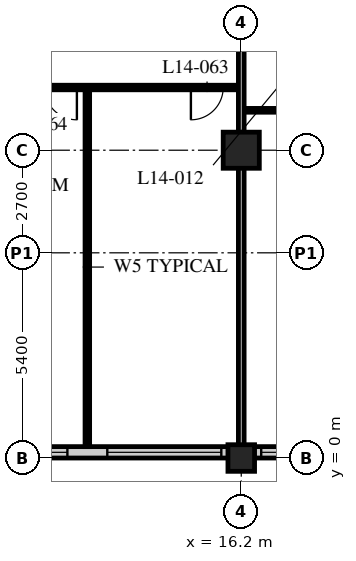
"""IFC4 building model, lengths in metres.
Left out: names, types, materials, properties, quantities, classifications, styles, units other than length and angle.
Written with IfcOpenShell. Run it as: python <this file> out.ifc"""

import sys

from ifc_helpers import new_model, si_unit, direction, frame, frame_2d, origin, origin_2d, place, context, subcontext, project, spatial, rectangle, hollow_rectangle, extrude, element, fill, save


model = new_model("IFC4")
c1 = context("Model", 3, precision=1e-05, world=origin(), true_north=direction((0.0, 1.0)))
c2 = subcontext(c1, "Body", "Model", "MODEL_VIEW")
j1 = project(units=[si_unit("LENGTHUNIT", "METRE"), si_unit("PLANEANGLEUNIT", "RADIAN")], contexts=[c1])
p1 = place(None, origin())
s1 = spatial("IfcSite", under=j1, at=p1, CompositionType="ELEMENT")
p2 = place(p1, origin())
s2 = spatial("IfcBuilding", under=s1, at=p2, CompositionType="ELEMENT")
p3 = place(p2, frame((0.0, 0.0, 60.2)))
s3 = spatial("IfcBuildingStorey", under=s2, at=p3, CompositionType="ELEMENT", Elevation=60.2)
p4 = place(p3, frame((16.2, 0.0, 0.0), z_axis=(0.0, 0.0, 1.0), x_axis=(1.0, 0.0, 0.0)))
e1 = element("IfcColumn", 1, at=p4, inside=s3, PredefinedType="COLUMN", context=c2, shape_type="SweptSolid", body=[
    extrude(hollow_rectangle(XDim=0.7, YDim=0.7, WallThickness=0.06, at=origin_2d()), origin(), (0.0, 0.0, 1.0), 3.4),
])
p5 = place(p3, frame((16.2, 8.1, 0.0), z_axis=(0.0, 0.0, 1.0), x_axis=(1.0, 0.0, 0.0)))
e2 = element("IfcColumn", 2, at=p5, inside=s3, PredefinedType="COLUMN", context=c2, shape_type="SweptSolid", body=[
    extrude(hollow_rectangle(XDim=0.95, YDim=0.95, WallThickness=0.095, at=origin_2d()), origin(), (0.0, 0.0, 1.0), 3.4),
])
p6 = place(p3, frame((8.4, 0.15, 0.0), z_axis=(0.0, 0.0, 1.0), x_axis=(1.0, 0.0, 0.0)))
e3 = element("IfcWall", 3, at=p6, inside=s3, PredefinedType="SOLIDWALL", context=c2, shape_type="SweptSolid", body=[
    extrude(rectangle(XDim=40.2, YDim=0.3, at=frame_2d((20.1, 0.0))), origin(), (0.0, 0.0, 1.0), 3.19),
])
p7 = place(p6, frame((0.225, 0.0, 0.9)))
e4 = element("IfcOpeningElement", 4, at=p7, cuts=e3, PredefinedType="OPENING", context=c2, shape_type="SweptSolid", body=[
    extrude(rectangle(XDim=3.0, YDim=2.0, at=frame_2d((1.5, 1.0))), frame((0.0, 0.16, 0.0), z_axis=(0.0, -1.0, 0.0), x_axis=(1.0, 0.0, 0.0)), (0.0, 0.0, 1.0), 0.32),
])
p8 = place(p6, frame((4.275, 0.0, 0.9)))
e5 = element("IfcOpeningElement", 5, at=p8, cuts=e3, PredefinedType="OPENING", context=c2, shape_type="SweptSolid", body=[
    extrude(rectangle(XDim=3.0, YDim=2.0, at=frame_2d((1.5, 1.0))), frame((0.0, 0.16, 0.0), z_axis=(0.0, -1.0, 0.0), x_axis=(1.0, 0.0, 0.0)), (0.0, 0.0, 1.0), 0.32),
])
p9 = place(p6, frame((8.325, 0.0, 0.9)))
e6 = element("IfcOpeningElement", 6, at=p9, cuts=e3, PredefinedType="OPENING", context=c2, shape_type="SweptSolid", body=[
    extrude(rectangle(XDim=3.0, YDim=2.0, at=frame_2d((1.5, 1.0))), frame((0.0, 0.16, 0.0), z_axis=(0.0, -1.0, 0.0), x_axis=(1.0, 0.0, 0.0)), (0.0, 0.0, 1.0), 0.32),
])
p10 = place(p6, frame((12.375, 0.0, 0.9)))
e7 = element("IfcOpeningElement", 7, at=p10, cuts=e3, PredefinedType="OPENING", context=c2, shape_type="SweptSolid", body=[
    extrude(rectangle(XDim=3.0, YDim=2.0, at=frame_2d((1.5, 1.0))), frame((0.0, 0.16, 0.0), z_axis=(0.0, -1.0, 0.0), x_axis=(1.0, 0.0, 0.0)), (0.0, 0.0, 1.0), 0.32),
])
p11 = place(p6, frame((16.425, 0.0, 0.9)))
e8 = element("IfcOpeningElement", 8, at=p11, cuts=e3, PredefinedType="OPENING", context=c2, shape_type="SweptSolid", body=[
    extrude(rectangle(XDim=3.0, YDim=2.0, at=frame_2d((1.5, 1.0))), frame((0.0, 0.16, 0.0), z_axis=(0.0, -1.0, 0.0), x_axis=(1.0, 0.0, 0.0)), (0.0, 0.0, 1.0), 0.32),
])
p12 = place(p6, frame((20.475, 0.0, 0.9)))
e9 = element("IfcOpeningElement", 9, at=p12, cuts=e3, PredefinedType="OPENING", context=c2, shape_type="SweptSolid", body=[
    extrude(rectangle(XDim=3.0, YDim=2.0, at=frame_2d((1.5, 1.0))), frame((0.0, 0.16, 0.0), z_axis=(0.0, -1.0, 0.0), x_axis=(1.0, 0.0, 0.0)), (0.0, 0.0, 1.0), 0.32),
])
p13 = place(p6, frame((24.525, 0.0, 0.9)))
e10 = element("IfcOpeningElement", 10, at=p13, cuts=e3, PredefinedType="OPENING", context=c2, shape_type="SweptSolid", body=[
    extrude(rectangle(XDim=3.0, YDim=2.0, at=frame_2d((1.5, 1.0))), frame((0.0, 0.16, 0.0), z_axis=(0.0, -1.0, 0.0), x_axis=(1.0, 0.0, 0.0)), (0.0, 0.0, 1.0), 0.32),
])
p14 = place(p6, frame((28.575, 0.0, 0.9)))
e11 = element("IfcOpeningElement", 11, at=p14, cuts=e3, PredefinedType="OPENING", context=c2, shape_type="SweptSolid", body=[
    extrude(rectangle(XDim=3.0, YDim=2.0, at=frame_2d((1.5, 1.0))), frame((0.0, 0.16, 0.0), z_axis=(0.0, -1.0, 0.0), x_axis=(1.0, 0.0, 0.0)), (0.0, 0.0, 1.0), 0.32),
])
p15 = place(p6, frame((32.625, 0.0, 0.9)))
e12 = element("IfcOpeningElement", 12, at=p15, cuts=e3, PredefinedType="OPENING", context=c2, shape_type="SweptSolid", body=[
    extrude(rectangle(XDim=3.0, YDim=2.0, at=frame_2d((1.5, 1.0))), frame((0.0, 0.16, 0.0), z_axis=(0.0, -1.0, 0.0), x_axis=(1.0, 0.0, 0.0)), (0.0, 0.0, 1.0), 0.32),
])
p16 = place(p6, frame((36.675, 0.0, 0.9)))
e13 = element("IfcOpeningElement", 13, at=p16, cuts=e3, PredefinedType="OPENING", context=c2, shape_type="SweptSolid", body=[
    extrude(rectangle(XDim=3.0, YDim=2.0, at=frame_2d((1.5, 1.0))), frame((0.0, 0.16, 0.0), z_axis=(0.0, -1.0, 0.0), x_axis=(1.0, 0.0, 0.0)), (0.0, 0.0, 1.0), 0.32),
])
p17 = place(p3, frame((16.2, 9.15, 0.0), z_axis=(0.0, 0.0, 1.0), x_axis=(1.0, 0.0, 0.0)))
e14 = element("IfcWall", 14, at=p17, inside=s3, PredefinedType="PARTITIONING", context=c2, shape_type="SweptSolid", body=[
    extrude(rectangle(XDim=2.3, YDim=0.1, at=frame_2d((1.15, 0.0))), origin(), (0.0, 0.0, 1.0), 3.19),
])
p18 = place(p3, frame((8.15, 9.75, 0.0), z_axis=(0.0, 0.0, 1.0), x_axis=(1.0, 0.0, 0.0)))
e15 = element("IfcWall", 15, at=p18, inside=s3, PredefinedType="PARTITIONING", context=c2, shape_type="SweptSolid", body=[
    extrude(rectangle(XDim=8.05, YDim=0.12, at=frame_2d((4.025, 0.0))), origin(), (0.0, 0.0, 1.0), 3.19),
])
p19 = place(p18, frame((6.725, 0.0, 0.0)))
e16 = element("IfcOpeningElement", 16, at=p19, cuts=e15, PredefinedType="OPENING", context=c2, shape_type="SweptSolid", body=[
    extrude(rectangle(XDim=0.85, YDim=2.1, at=frame_2d((0.425, 1.05))), frame((0.0, 0.07, 0.0), z_axis=(0.0, -1.0, 0.0), x_axis=(1.0, 0.0, 0.0)), (0.0, 0.0, 1.0), 0.14),
])
p20 = place(p18, frame((2.875, 0.0, 0.0)))
e17 = element("IfcOpeningElement", 17, at=p20, cuts=e15, PredefinedType="OPENING", context=c2, shape_type="SweptSolid", body=[
    extrude(rectangle(XDim=0.85, YDim=2.1, at=frame_2d((0.425, 1.05))), frame((0.0, 0.07, 0.0), z_axis=(0.0, -1.0, 0.0), x_axis=(1.0, 0.0, 0.0)), (0.0, 0.0, 1.0), 0.14),
])
p21 = place(p3, frame((12.15, 9.75, 0.0), z_axis=(0.0, 0.0, 1.0), x_axis=(0.0, -1.0, 0.0)))
e18 = element("IfcWall", 18, at=p21, inside=s3, PredefinedType="PARTITIONING", context=c2, shape_type="SweptSolid", body=[
    extrude(rectangle(XDim=9.45, YDim=0.12, at=frame_2d((4.725, 0.0))), origin(), (0.0, 0.0, 1.0), 3.19),
])
p22 = place(p3, frame((16.2, 12.15, 0.0), z_axis=(0.0, 0.0, 1.0), x_axis=(0.0, -1.0, 0.0)))
e19 = element("IfcWall", 19, at=p22, inside=s3, PredefinedType="PARTITIONING", context=c2, shape_type="SweptSolid", body=[
    extrude(rectangle(XDim=11.85, YDim=0.15, at=frame_2d((5.925, 0.0))), origin(), (0.0, 0.0, 1.0), 2.578),
])
p23 = place(p7, origin())
e20 = element("IfcWindow", 20, at=p23, inside=s3, PartitioningType="SINGLE_PANEL", PredefinedType="WINDOW", context=c2, shape_type="SweptSolid", body=[
    extrude(rectangle(XDim=3.0, YDim=2.0, at=frame_2d((1.5, 1.0))), frame((0.0, 0.03, 0.0), z_axis=(0.0, -1.0, 0.0), x_axis=(1.0, 0.0, 0.0)), (0.0, 0.0, 1.0), 0.06),
])
fill(e4, e20)
p24 = place(p8, origin())
e21 = element("IfcWindow", 21, at=p24, inside=s3, PartitioningType="SINGLE_PANEL", PredefinedType="WINDOW", context=c2, shape_type="SweptSolid", body=[
    extrude(rectangle(XDim=3.0, YDim=2.0, at=frame_2d((1.5, 1.0))), frame((0.0, 0.03, 0.0), z_axis=(0.0, -1.0, 0.0), x_axis=(1.0, 0.0, 0.0)), (0.0, 0.0, 1.0), 0.06),
])
fill(e5, e21)
p25 = place(p9, origin())
e22 = element("IfcWindow", 22, at=p25, inside=s3, PartitioningType="SINGLE_PANEL", PredefinedType="WINDOW", context=c2, shape_type="SweptSolid", body=[
    extrude(rectangle(XDim=3.0, YDim=2.0, at=frame_2d((1.5, 1.0))), frame((0.0, 0.03, 0.0), z_axis=(0.0, -1.0, 0.0), x_axis=(1.0, 0.0, 0.0)), (0.0, 0.0, 1.0), 0.06),
])
fill(e6, e22)
p26 = place(p19, origin())
e23 = element("IfcDoor", 23, at=p26, inside=s3, OperationType="SINGLE_SWING_RIGHT", PredefinedType="DOOR", context=c2, shape_type="SweptSolid", body=[
    extrude(rectangle(XDim=0.85, YDim=2.1, at=frame_2d((0.425, 1.05))), frame((0.0, 0.025, 0.0), z_axis=(0.0, -1.0, 0.0), x_axis=(1.0, 0.0, 0.0)), (0.0, 0.0, 1.0), 0.05),
])
fill(e16, e23)
p27 = place(p20, origin())
e24 = element("IfcDoor", 24, at=p27, inside=s3, OperationType="SINGLE_SWING_LEFT", PredefinedType="DOOR", context=c2, shape_type="SweptSolid", body=[
    extrude(rectangle(XDim=0.85, YDim=2.1, at=frame_2d((0.425, 1.05))), frame((0.0, 0.025, 0.0), z_axis=(0.0, -1.0, 0.0), x_axis=(1.0, 0.0, 0.0)), (0.0, 0.0, 1.0), 0.05),
])
fill(e17, e24)
save(model, sys.argv[1])
